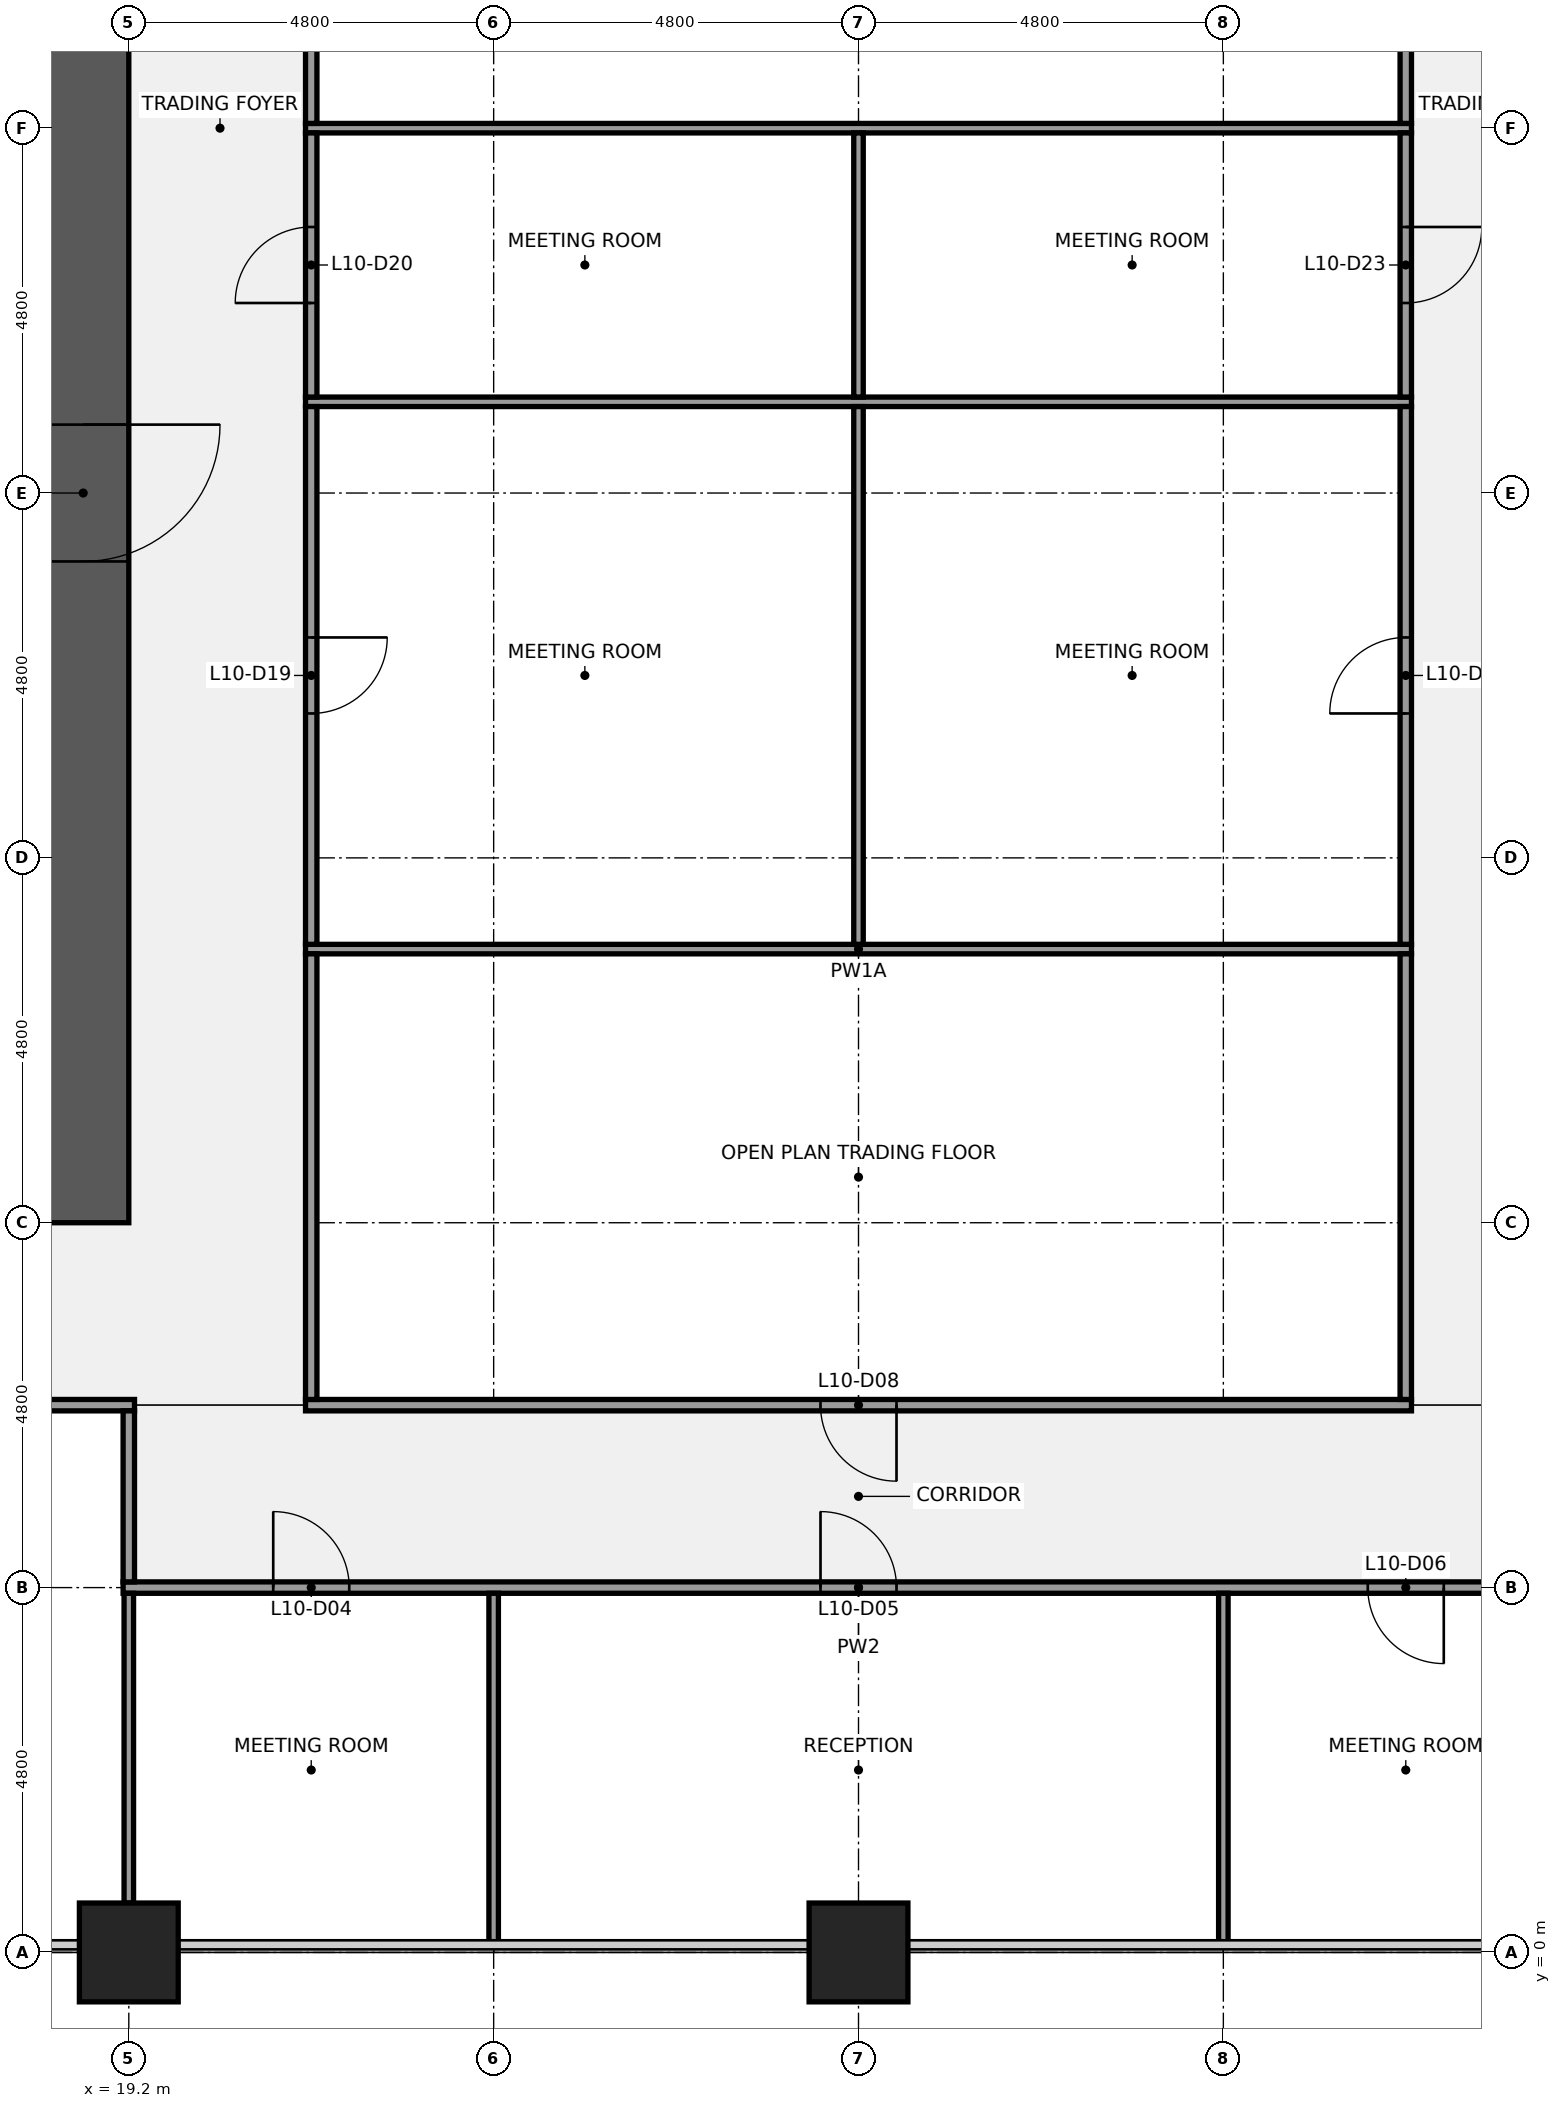
"""IFC4 building model, lengths in metres.
Left out: names, types, materials, properties, quantities, classifications, styles, units other than length and angle.
Written with IfcOpenShell. Run it as: python <this file> out.ifc"""

import sys

from ifc_helpers import new_model, si_unit, direction, frame, frame_2d, origin, origin_2d, place, context, subcontext, project, spatial, rectangle, extrude, element, fill, save


model = new_model("IFC4")
c1 = context("Model", 3, precision=1e-05, world=origin(), true_north=direction((0.0, 1.0)))
c2 = subcontext(c1, "Body", "Model", "MODEL_VIEW")
j1 = project(units=[si_unit("LENGTHUNIT", "METRE"), si_unit("PLANEANGLEUNIT", "RADIAN")], contexts=[c1])
p1 = place(None, origin())
s1 = spatial("IfcSite", under=j1, at=p1, CompositionType="ELEMENT")
p2 = place(p1, origin())
s2 = spatial("IfcBuilding", under=s1, at=p2, CompositionType="ELEMENT")
p3 = place(p2, frame((0.0, 0.0, 51.0)))
s3 = spatial("IfcBuildingStorey", under=s2, at=p3, CompositionType="ELEMENT", Elevation=51.0)
for number, where, z_axis, x_axis in (
    (1, (19.2, 0.0, 0.0), (0.0, 0.0, 1.0), (1.0, 0.0, 0.0)),
    (2, (28.8, 0.0, 0.0), (0.0, 0.0, 1.0), (1.0, 0.0, 0.0)),
):
    element("IfcColumn", number, at=place(p3, frame(where, z_axis=z_axis, x_axis=x_axis)), inside=s3, PredefinedType="COLUMN", context=c2, shape_type="SweptSolid", body=[
        extrude(rectangle(XDim=1.3, YDim=1.3, at=origin_2d()), origin(), (0.0, 0.0, 1.0), 4.0),
    ])
p4 = place(p3, frame((18.6, 38.4, 0.0), z_axis=(0.0, 0.0, 1.0), x_axis=(0.0, -1.0, 0.0)))
e3 = element("IfcWall", 3, at=p4, inside=s3, PredefinedType="SHEAR", context=c2, shape_type="SweptSolid", body=[
    extrude(rectangle(XDim=28.8, YDim=1.2, at=frame_2d((14.4, 0.0))), origin(), (0.0, 0.0, 1.0), 3.84),
])
p5 = place(p4, frame((18.3, 0.0, 0.0)))
e4 = element("IfcOpeningElement", 4, at=p5, cuts=e3, PredefinedType="OPENING", context=c2, shape_type="SweptSolid", body=[
    extrude(rectangle(XDim=1.8, YDim=2.1, at=frame_2d((0.9, 1.05))), frame((0.0, 0.61, 0.0), z_axis=(0.0, -1.0, 0.0), x_axis=(1.0, 0.0, 0.0)), (0.0, 0.0, 1.0), 1.22),
])
p6 = place(p4, frame((8.7, 0.0, 0.0)))
e5 = element("IfcOpeningElement", 5, at=p6, cuts=e3, PredefinedType="OPENING", context=c2, shape_type="SweptSolid", body=[
    extrude(rectangle(XDim=1.8, YDim=2.1, at=frame_2d((0.9, 1.05))), frame((0.0, 0.61, 0.0), z_axis=(0.0, -1.0, 0.0), x_axis=(1.0, 0.0, 0.0)), (0.0, 0.0, 1.0), 1.22),
])
p7 = place(p3, frame((19.125, 4.8, 0.0), z_axis=(0.0, 0.0, 1.0), x_axis=(1.0, 0.0, 0.0)))
e6 = element("IfcWall", 6, at=p7, inside=s3, PredefinedType="PARTITIONING", context=c2, shape_type="SweptSolid", body=[
    extrude(rectangle(XDim=19.35, YDim=0.15, at=frame_2d((9.675, 0.0))), origin(), (0.0, 0.0, 1.0), 2.87),
])
p8 = place(p7, frame((1.975, 0.0, 0.0)))
e7 = element("IfcOpeningElement", 7, at=p8, cuts=e6, PredefinedType="OPENING", context=c2, shape_type="SweptSolid", body=[
    extrude(rectangle(XDim=1.0, YDim=2.1, at=frame_2d((0.5, 1.05))), frame((0.0, 0.085, 0.0), z_axis=(0.0, -1.0, 0.0), x_axis=(1.0, 0.0, 0.0)), (0.0, 0.0, 1.0), 0.17),
])
p9 = place(p7, frame((9.175, 0.0, 0.0)))
e8 = element("IfcOpeningElement", 8, at=p9, cuts=e6, PredefinedType="OPENING", context=c2, shape_type="SweptSolid", body=[
    extrude(rectangle(XDim=1.0, YDim=2.1, at=frame_2d((0.5, 1.05))), frame((0.0, 0.085, 0.0), z_axis=(0.0, -1.0, 0.0), x_axis=(1.0, 0.0, 0.0)), (0.0, 0.0, 1.0), 0.17),
])
p10 = place(p7, frame((16.375, 0.0, 0.0)))
e9 = element("IfcOpeningElement", 9, at=p10, cuts=e6, PredefinedType="OPENING", context=c2, shape_type="SweptSolid", body=[
    extrude(rectangle(XDim=1.0, YDim=2.1, at=frame_2d((0.5, 1.05))), frame((0.0, 0.085, 0.0), z_axis=(0.0, -1.0, 0.0), x_axis=(1.0, 0.0, 0.0)), (0.0, 0.0, 1.0), 0.17),
])
p11 = place(p3, frame((9.525, 7.2, 0.0), z_axis=(0.0, 0.0, 1.0), x_axis=(1.0, 0.0, 0.0)))
e10 = element("IfcWall", 10, at=p11, inside=s3, PredefinedType="PARTITIONING", context=c2, shape_type="SweptSolid", body=[
    extrude(rectangle(XDim=9.75, YDim=0.15, at=frame_2d((4.875, 0.0))), origin(), (0.0, 0.0, 1.0), 2.87),
])
p12 = place(p11, frame((4.375, 0.0, 0.0)))
e11 = element("IfcOpeningElement", 11, at=p12, cuts=e10, PredefinedType="OPENING", context=c2, shape_type="SweptSolid", body=[
    extrude(rectangle(XDim=1.0, YDim=2.1, at=frame_2d((0.5, 1.05))), frame((0.0, 0.085, 0.0), z_axis=(0.0, -1.0, 0.0), x_axis=(1.0, 0.0, 0.0)), (0.0, 0.0, 1.0), 0.17),
])
p13 = place(p3, frame((21.525, 7.2, 0.0), z_axis=(0.0, 0.0, 1.0), x_axis=(1.0, 0.0, 0.0)))
e12 = element("IfcWall", 12, at=p13, inside=s3, PredefinedType="PARTITIONING", context=c2, shape_type="SweptSolid", body=[
    extrude(rectangle(XDim=14.55, YDim=0.15, at=frame_2d((7.275, 0.0))), origin(), (0.0, 0.0, 1.0), 2.87),
])
p14 = place(p13, frame((6.775, 0.0, 0.0)))
e13 = element("IfcOpeningElement", 13, at=p14, cuts=e12, PredefinedType="OPENING", context=c2, shape_type="SweptSolid", body=[
    extrude(rectangle(XDim=1.0, YDim=2.1, at=frame_2d((0.5, 1.05))), frame((0.0, 0.085, 0.0), z_axis=(0.0, -1.0, 0.0), x_axis=(1.0, 0.0, 0.0)), (0.0, 0.0, 1.0), 0.17),
])
for number, where, z_axis, x_axis in (
    (14, (21.525, 13.2, 0.0), (0.0, 0.0, 1.0), (1.0, 0.0, 0.0)),
    (15, (21.525, 20.4, 0.0), (0.0, 0.0, 1.0), (1.0, 0.0, 0.0)),
    (16, (21.525, 24.0, 0.0), (0.0, 0.0, 1.0), (1.0, 0.0, 0.0)),
):
    element("IfcWall", number, at=place(p3, frame(where, z_axis=z_axis, x_axis=x_axis)), inside=s3, PredefinedType="PARTITIONING", context=c2, shape_type="SweptSolid", body=[
        extrude(rectangle(XDim=14.55, YDim=0.125, at=frame_2d((7.275, 0.0))), origin(), (0.0, 0.0, 1.0), 2.87),
    ])
p15 = place(p3, frame((19.2, 0.65, 0.0), z_axis=(0.0, 0.0, 1.0), x_axis=(0.0, 1.0, 0.0)))
e17 = element("IfcWall", 17, at=p15, inside=s3, PredefinedType="PARTITIONING", context=c2, shape_type="SweptSolid", body=[
    extrude(rectangle(XDim=4.075, YDim=0.125, at=frame_2d((2.038, 0.0))), origin(), (0.0, 0.0, 1.0), 2.87),
])
p16 = place(p3, frame((19.2, 4.875, 0.0), z_axis=(0.0, 0.0, 1.0), x_axis=(0.0, 1.0, 0.0)))
e18 = element("IfcWall", 18, at=p16, inside=s3, PredefinedType="PARTITIONING", context=c2, shape_type="SweptSolid", body=[
    extrude(rectangle(XDim=2.25, YDim=0.15, at=frame_2d((1.125, 0.0))), origin(), (0.0, 0.0, 1.0), 2.87),
])
p17 = place(p3, frame((21.6, 7.275, 0.0), z_axis=(0.0, 0.0, 1.0), x_axis=(0.0, 1.0, 0.0)))
e19 = element("IfcWall", 19, at=p17, inside=s3, PredefinedType="PARTITIONING", context=c2, shape_type="SweptSolid", body=[
    extrude(rectangle(XDim=5.863, YDim=0.15, at=frame_2d((2.931, 0.0))), origin(), (0.0, 0.0, 1.0), 2.87),
])
p18 = place(p3, frame((21.6, 13.262, 0.0), z_axis=(0.0, 0.0, 1.0), x_axis=(0.0, 1.0, 0.0)))
e20 = element("IfcWall", 20, at=p18, inside=s3, PredefinedType="PARTITIONING", context=c2, shape_type="SweptSolid", body=[
    extrude(rectangle(XDim=7.075, YDim=0.15, at=frame_2d((3.538, 0.0))), origin(), (0.0, 0.0, 1.0), 2.87),
])
p19 = place(p18, frame((3.038, 0.0, 0.0)))
e21 = element("IfcOpeningElement", 21, at=p19, cuts=e20, PredefinedType="OPENING", context=c2, shape_type="SweptSolid", body=[
    extrude(rectangle(XDim=1.0, YDim=2.1, at=frame_2d((0.5, 1.05))), frame((0.0, 0.085, 0.0), z_axis=(0.0, -1.0, 0.0), x_axis=(1.0, 0.0, 0.0)), (0.0, 0.0, 1.0), 0.17),
])
p20 = place(p3, frame((21.6, 20.462, 0.0), z_axis=(0.0, 0.0, 1.0), x_axis=(0.0, 1.0, 0.0)))
e22 = element("IfcWall", 22, at=p20, inside=s3, PredefinedType="PARTITIONING", context=c2, shape_type="SweptSolid", body=[
    extrude(rectangle(XDim=3.475, YDim=0.15, at=frame_2d((1.738, 0.0))), origin(), (0.0, 0.0, 1.0), 2.87),
])
p21 = place(p20, frame((1.238, 0.0, 0.0)))
e23 = element("IfcOpeningElement", 23, at=p21, cuts=e22, PredefinedType="OPENING", context=c2, shape_type="SweptSolid", body=[
    extrude(rectangle(XDim=1.0, YDim=2.1, at=frame_2d((0.5, 1.05))), frame((0.0, 0.085, 0.0), z_axis=(0.0, -1.0, 0.0), x_axis=(1.0, 0.0, 0.0)), (0.0, 0.0, 1.0), 0.17),
])
p22 = place(p3, frame((21.6, 24.062, 0.0), z_axis=(0.0, 0.0, 1.0), x_axis=(0.0, 1.0, 0.0)))
e24 = element("IfcWall", 24, at=p22, inside=s3, PredefinedType="PARTITIONING", context=c2, shape_type="SweptSolid", body=[
    extrude(rectangle(XDim=9.475, YDim=0.15, at=frame_2d((4.738, 0.0))), origin(), (0.0, 0.0, 1.0), 2.87),
])
p23 = place(p22, frame((4.238, 0.0, 0.0)))
e25 = element("IfcOpeningElement", 25, at=p23, cuts=e24, PredefinedType="OPENING", context=c2, shape_type="SweptSolid", body=[
    extrude(rectangle(XDim=1.0, YDim=2.1, at=frame_2d((0.5, 1.05))), frame((0.0, 0.085, 0.0), z_axis=(0.0, -1.0, 0.0), x_axis=(1.0, 0.0, 0.0)), (0.0, 0.0, 1.0), 0.17),
])
p24 = place(p3, frame((24.0, 0.1, 0.0), z_axis=(0.0, 0.0, 1.0), x_axis=(0.0, 1.0, 0.0)))
e26 = element("IfcWall", 26, at=p24, inside=s3, PredefinedType="PARTITIONING", context=c2, shape_type="SweptSolid", body=[
    extrude(rectangle(XDim=4.625, YDim=0.125, at=frame_2d((2.312, 0.0))), origin(), (0.0, 0.0, 1.0), 2.87),
])
p25 = place(p3, frame((28.8, 13.262, 0.0), z_axis=(0.0, 0.0, 1.0), x_axis=(0.0, 1.0, 0.0)))
e27 = element("IfcWall", 27, at=p25, inside=s3, PredefinedType="PARTITIONING", context=c2, shape_type="SweptSolid", body=[
    extrude(rectangle(XDim=7.075, YDim=0.125, at=frame_2d((3.538, 0.0))), origin(), (0.0, 0.0, 1.0), 2.87),
])
p26 = place(p3, frame((28.8, 20.462, 0.0), z_axis=(0.0, 0.0, 1.0), x_axis=(0.0, 1.0, 0.0)))
e28 = element("IfcWall", 28, at=p26, inside=s3, PredefinedType="PARTITIONING", context=c2, shape_type="SweptSolid", body=[
    extrude(rectangle(XDim=3.475, YDim=0.125, at=frame_2d((1.738, 0.0))), origin(), (0.0, 0.0, 1.0), 2.87),
])
p27 = place(p3, frame((33.6, 0.1, 0.0), z_axis=(0.0, 0.0, 1.0), x_axis=(0.0, 1.0, 0.0)))
e29 = element("IfcWall", 29, at=p27, inside=s3, PredefinedType="PARTITIONING", context=c2, shape_type="SweptSolid", body=[
    extrude(rectangle(XDim=4.625, YDim=0.125, at=frame_2d((2.312, 0.0))), origin(), (0.0, 0.0, 1.0), 2.87),
])
p28 = place(p3, frame((36.0, 7.275, 0.0), z_axis=(0.0, 0.0, 1.0), x_axis=(0.0, 1.0, 0.0)))
e30 = element("IfcWall", 30, at=p28, inside=s3, PredefinedType="PARTITIONING", context=c2, shape_type="SweptSolid", body=[
    extrude(rectangle(XDim=5.863, YDim=0.15, at=frame_2d((2.931, 0.0))), origin(), (0.0, 0.0, 1.0), 2.87),
])
p29 = place(p3, frame((36.0, 13.262, 0.0), z_axis=(0.0, 0.0, 1.0), x_axis=(0.0, 1.0, 0.0)))
e31 = element("IfcWall", 31, at=p29, inside=s3, PredefinedType="PARTITIONING", context=c2, shape_type="SweptSolid", body=[
    extrude(rectangle(XDim=7.075, YDim=0.15, at=frame_2d((3.538, 0.0))), origin(), (0.0, 0.0, 1.0), 2.87),
])
p30 = place(p29, frame((3.038, 0.0, 0.0)))
e32 = element("IfcOpeningElement", 32, at=p30, cuts=e31, PredefinedType="OPENING", context=c2, shape_type="SweptSolid", body=[
    extrude(rectangle(XDim=1.0, YDim=2.1, at=frame_2d((0.5, 1.05))), frame((0.0, 0.085, 0.0), z_axis=(0.0, -1.0, 0.0), x_axis=(1.0, 0.0, 0.0)), (0.0, 0.0, 1.0), 0.17),
])
p31 = place(p3, frame((36.0, 20.462, 0.0), z_axis=(0.0, 0.0, 1.0), x_axis=(0.0, 1.0, 0.0)))
e33 = element("IfcWall", 33, at=p31, inside=s3, PredefinedType="PARTITIONING", context=c2, shape_type="SweptSolid", body=[
    extrude(rectangle(XDim=3.475, YDim=0.15, at=frame_2d((1.738, 0.0))), origin(), (0.0, 0.0, 1.0), 2.87),
])
p32 = place(p31, frame((1.238, 0.0, 0.0)))
e34 = element("IfcOpeningElement", 34, at=p32, cuts=e33, PredefinedType="OPENING", context=c2, shape_type="SweptSolid", body=[
    extrude(rectangle(XDim=1.0, YDim=2.1, at=frame_2d((0.5, 1.05))), frame((0.0, 0.085, 0.0), z_axis=(0.0, -1.0, 0.0), x_axis=(1.0, 0.0, 0.0)), (0.0, 0.0, 1.0), 0.17),
])
p33 = place(p3, frame((36.0, 24.062, 0.0), z_axis=(0.0, 0.0, 1.0), x_axis=(0.0, 1.0, 0.0)))
e35 = element("IfcWall", 35, at=p33, inside=s3, PredefinedType="PARTITIONING", context=c2, shape_type="SweptSolid", body=[
    extrude(rectangle(XDim=9.475, YDim=0.15, at=frame_2d((4.738, 0.0))), origin(), (0.0, 0.0, 1.0), 2.87),
])
for number, where, z_axis, x_axis in (
    (36, (19.2, -1.075, 0.0), (0.0, 0.0, 1.0), (1.0, 0.0, 0.0)),
    (37, (38.4, -1.075, 0.0), (0.0, 0.0, 1.0), (1.0, 0.0, 0.0)),
):
    element("IfcColumn", number, at=place(p3, frame(where, z_axis=z_axis, x_axis=x_axis)), inside=s3, PredefinedType="PILASTER", context=c2, shape_type="SweptSolid", body=[
        extrude(rectangle(XDim=4.2, YDim=0.85, at=origin_2d()), origin(), (0.0, 0.0, 1.0), 4.0),
    ])
p34 = place(p5, origin())
e38 = element("IfcDoor", 38, at=p34, inside=s3, OperationType="DOUBLE_DOOR_SINGLE_SWING", PredefinedType="DOOR", context=c2, shape_type="SweptSolid", body=[
    extrude(rectangle(XDim=1.8, YDim=2.1, at=frame_2d((0.9, 1.05))), frame((0.0, 0.025, 0.0), z_axis=(0.0, -1.0, 0.0), x_axis=(1.0, 0.0, 0.0)), (0.0, 0.0, 1.0), 0.05),
])
fill(e4, e38)
p35 = place(p8, origin())
e39 = element("IfcDoor", 39, at=p35, inside=s3, OperationType="SINGLE_SWING_LEFT", PredefinedType="DOOR", context=c2, shape_type="SweptSolid", body=[
    extrude(rectangle(XDim=1.0, YDim=2.1, at=frame_2d((0.5, 1.05))), frame((0.0, 0.025, 0.0), z_axis=(0.0, -1.0, 0.0), x_axis=(1.0, 0.0, 0.0)), (0.0, 0.0, 1.0), 0.05),
])
fill(e7, e39)
p36 = place(p9, origin())
e40 = element("IfcDoor", 40, at=p36, inside=s3, OperationType="SINGLE_SWING_LEFT", PredefinedType="DOOR", context=c2, shape_type="SweptSolid", body=[
    extrude(rectangle(XDim=1.0, YDim=2.1, at=frame_2d((0.5, 1.05))), frame((0.0, 0.025, 0.0), z_axis=(0.0, -1.0, 0.0), x_axis=(1.0, 0.0, 0.0)), (0.0, 0.0, 1.0), 0.05),
])
fill(e8, e40)
p37 = place(p10, origin())
e41 = element("IfcDoor", 41, at=p37, inside=s3, OperationType="SINGLE_SWING_RIGHT", PredefinedType="DOOR", context=c2, shape_type="SweptSolid", body=[
    extrude(rectangle(XDim=1.0, YDim=2.1, at=frame_2d((0.5, 1.05))), frame((0.0, 0.025, 0.0), z_axis=(0.0, -1.0, 0.0), x_axis=(1.0, 0.0, 0.0)), (0.0, 0.0, 1.0), 0.05),
])
fill(e9, e41)
p38 = place(p14, origin())
e42 = element("IfcDoor", 42, at=p38, inside=s3, OperationType="SINGLE_SWING_RIGHT", PredefinedType="DOOR", context=c2, shape_type="SweptSolid", body=[
    extrude(rectangle(XDim=1.0, YDim=2.1, at=frame_2d((0.5, 1.05))), frame((0.0, 0.025, 0.0), z_axis=(0.0, -1.0, 0.0), x_axis=(1.0, 0.0, 0.0)), (0.0, 0.0, 1.0), 0.05),
])
fill(e13, e42)
p39 = place(p19, origin())
e43 = element("IfcDoor", 43, at=p39, inside=s3, OperationType="SINGLE_SWING_RIGHT", PredefinedType="DOOR", context=c2, shape_type="SweptSolid", body=[
    extrude(rectangle(XDim=1.0, YDim=2.1, at=frame_2d((0.5, 1.05))), frame((0.0, 0.025, 0.0), z_axis=(0.0, -1.0, 0.0), x_axis=(1.0, 0.0, 0.0)), (0.0, 0.0, 1.0), 0.05),
])
fill(e21, e43)
p40 = place(p21, origin())
e44 = element("IfcDoor", 44, at=p40, inside=s3, OperationType="SINGLE_SWING_LEFT", PredefinedType="DOOR", context=c2, shape_type="SweptSolid", body=[
    extrude(rectangle(XDim=1.0, YDim=2.1, at=frame_2d((0.5, 1.05))), frame((0.0, 0.025, 0.0), z_axis=(0.0, -1.0, 0.0), x_axis=(1.0, 0.0, 0.0)), (0.0, 0.0, 1.0), 0.05),
])
fill(e23, e44)
p41 = place(p30, origin())
e45 = element("IfcDoor", 45, at=p41, inside=s3, OperationType="SINGLE_SWING_LEFT", PredefinedType="DOOR", context=c2, shape_type="SweptSolid", body=[
    extrude(rectangle(XDim=1.0, YDim=2.1, at=frame_2d((0.5, 1.05))), frame((0.0, 0.025, 0.0), z_axis=(0.0, -1.0, 0.0), x_axis=(1.0, 0.0, 0.0)), (0.0, 0.0, 1.0), 0.05),
])
fill(e32, e45)
p42 = place(p32, origin())
e46 = element("IfcDoor", 46, at=p42, inside=s3, OperationType="SINGLE_SWING_RIGHT", PredefinedType="DOOR", context=c2, shape_type="SweptSolid", body=[
    extrude(rectangle(XDim=1.0, YDim=2.1, at=frame_2d((0.5, 1.05))), frame((0.0, 0.025, 0.0), z_axis=(0.0, -1.0, 0.0), x_axis=(1.0, 0.0, 0.0)), (0.0, 0.0, 1.0), 0.05),
])
fill(e34, e46)
save(model, sys.argv[1])
